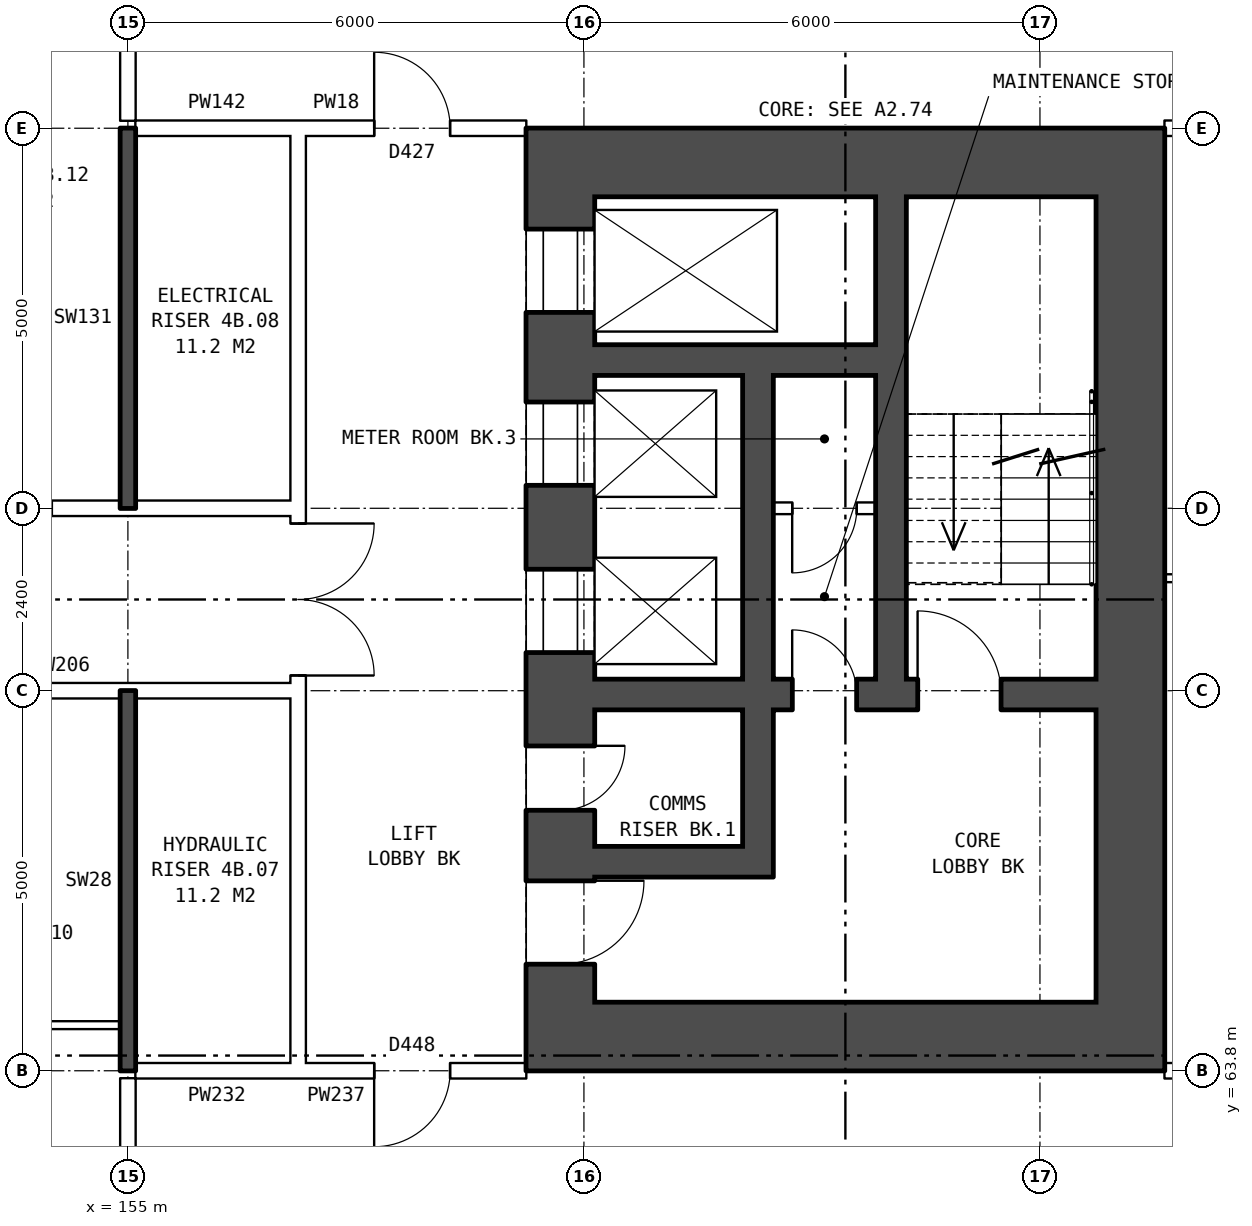
"""IFC4 building model, lengths in metres.
Left out: names, types, materials, properties, quantities, classifications, styles, units other than length and angle.
Written with IfcOpenShell. Run it as: python <this file> out.ifc"""

import sys

from ifc_helpers import new_model, si_unit, direction, frame, frame_2d, origin, place, context, subcontext, project, spatial, rectangle, extrude, element, fill, save


model = new_model("IFC4")
c1 = context("Model", 3, precision=1e-05, world=origin(), true_north=direction((0.0, 1.0)))
c2 = subcontext(c1, "Body", "Model", "MODEL_VIEW")
j1 = project(units=[si_unit("LENGTHUNIT", "METRE"), si_unit("PLANEANGLEUNIT", "RADIAN")], contexts=[c1])
p1 = place(None, origin())
s1 = spatial("IfcSite", under=j1, at=p1, CompositionType="ELEMENT")
p2 = place(p1, origin())
s2 = spatial("IfcBuilding", under=s1, at=p2, CompositionType="ELEMENT")
p3 = place(p2, frame((0.0, 0.0, 19.5)))
s3 = spatial("IfcBuildingStorey", under=s2, at=p3, CompositionType="ELEMENT", Elevation=19.5)
p4 = place(p3, frame((160.69, 75.3, 0.0), z_axis=(0.0, 0.0, 1.0), x_axis=(0.0, -1.0, 0.0)))
e1 = element("IfcWall", 1, at=p4, inside=s3, PredefinedType="SHEAR", context=c2, shape_type="SweptSolid", body=[
    extrude(rectangle(XDim=10.6, YDim=0.9, at=frame_2d((5.3, 0.0))), origin(), (0.0, 0.0, 1.0), 2.85),
])
p5 = place(p4, frame((0.425, 0.0, 0.0)))
e2 = element("IfcOpeningElement", 2, at=p5, cuts=e1, PredefinedType="OPENING", context=c2, shape_type="SweptSolid", body=[
    extrude(rectangle(XDim=1.1, YDim=2.1, at=frame_2d((0.55, 1.05))), frame((0.0, 0.46, 0.0), z_axis=(0.0, -1.0, 0.0), x_axis=(1.0, 0.0, 0.0)), (0.0, 0.0, 1.0), 0.92),
])
p6 = place(p4, frame((2.7, 0.0, 0.0)))
e3 = element("IfcOpeningElement", 3, at=p6, cuts=e1, PredefinedType="OPENING", context=c2, shape_type="SweptSolid", body=[
    extrude(rectangle(XDim=1.1, YDim=2.1, at=frame_2d((0.55, 1.05))), frame((0.0, 0.46, 0.0), z_axis=(0.0, -1.0, 0.0), x_axis=(1.0, 0.0, 0.0)), (0.0, 0.0, 1.0), 0.92),
])
p7 = place(p4, frame((4.9, 0.0, 0.0)))
e4 = element("IfcOpeningElement", 4, at=p7, cuts=e1, PredefinedType="OPENING", context=c2, shape_type="SweptSolid", body=[
    extrude(rectangle(XDim=1.1, YDim=2.1, at=frame_2d((0.55, 1.05))), frame((0.0, 0.46, 0.0), z_axis=(0.0, -1.0, 0.0), x_axis=(1.0, 0.0, 0.0)), (0.0, 0.0, 1.0), 0.92),
])
p8 = place(p4, frame((9.0, 0.0, 0.0)))
e5 = element("IfcOpeningElement", 5, at=p8, cuts=e1, PredefinedType="OPENING", context=c2, shape_type="SweptSolid", body=[
    extrude(rectangle(XDim=1.1, YDim=2.1, at=frame_2d((0.55, 1.05))), frame((0.0, 0.46, 0.0), z_axis=(0.0, -1.0, 0.0), x_axis=(1.0, 0.0, 0.0)), (0.0, 0.0, 1.0), 0.92),
])
p9 = place(p4, frame((7.225, 0.0, 0.0)))
e6 = element("IfcOpeningElement", 6, at=p9, cuts=e1, PredefinedType="OPENING", context=c2, shape_type="SweptSolid", body=[
    extrude(rectangle(XDim=0.85, YDim=2.1, at=frame_2d((0.425, 1.05))), frame((0.0, 0.46, 0.0), z_axis=(0.0, -1.0, 0.0), x_axis=(1.0, 0.0, 0.0)), (0.0, 0.0, 1.0), 0.92),
])
p10 = place(p3, frame((168.19, 75.3, 0.0), z_axis=(0.0, 0.0, 1.0), x_axis=(0.0, -1.0, 0.0)))
e7 = element("IfcWall", 7, at=p10, inside=s3, PredefinedType="SHEAR", context=c2, shape_type="SweptSolid", body=[
    extrude(rectangle(XDim=10.6, YDim=0.9, at=frame_2d((5.3, 0.0))), origin(), (0.0, 0.0, 1.0), 2.85),
])
for number, where, z_axis, x_axis in (
    (8, (160.24, 75.75, 0.0), (0.0, 0.0, 1.0), (1.0, 0.0, 0.0)),
    (9, (160.24, 64.25, 0.0), (0.0, 0.0, 1.0), (1.0, 0.0, 0.0)),
):
    element("IfcWall", number, at=place(p3, frame(where, z_axis=z_axis, x_axis=x_axis)), inside=s3, PredefinedType="SHEAR", context=c2, shape_type="SweptSolid", body=[
        extrude(rectangle(XDim=8.4, YDim=0.9, at=frame_2d((4.2, 0.0))), origin(), (0.0, 0.0, 1.0), 2.85),
    ])
p11 = place(p3, frame((161.14, 73.15, 0.0), z_axis=(0.0, 0.0, 1.0), x_axis=(1.0, 0.0, 0.0)))
e10 = element("IfcWall", 10, at=p11, inside=s3, PredefinedType="SHEAR", context=c2, shape_type="SweptSolid", body=[
    extrude(rectangle(XDim=3.7, YDim=0.4, at=frame_2d((1.85, 0.0))), origin(), (0.0, 0.0, 1.0), 2.85),
])
p12 = place(p3, frame((163.49, 71.2, 0.0), z_axis=(0.0, 0.0, 1.0), x_axis=(1.0, 0.0, 0.0)))
e11 = element("IfcWall", 11, at=p12, inside=s3, PredefinedType="PARTITIONING", context=c2, shape_type="SweptSolid", body=[
    extrude(rectangle(XDim=1.35, YDim=0.15, at=frame_2d((0.675, 0.0))), origin(), (0.0, 0.0, 1.0), 2.85),
])
p13 = place(p12, frame((0.25, 0.0, 0.0)))
e12 = element("IfcOpeningElement", 12, at=p13, cuts=e11, PredefinedType="OPENING", context=c2, shape_type="SweptSolid", body=[
    extrude(rectangle(XDim=0.85, YDim=2.1, at=frame_2d((0.425, 1.05))), frame((0.0, 0.085, 0.0), z_axis=(0.0, -1.0, 0.0), x_axis=(1.0, 0.0, 0.0)), (0.0, 0.0, 1.0), 0.17),
])
p14 = place(p3, frame((161.14, 68.75, 0.0), z_axis=(0.0, 0.0, 1.0), x_axis=(1.0, 0.0, 0.0)))
e13 = element("IfcWall", 13, at=p14, inside=s3, PredefinedType="SHEAR", context=c2, shape_type="SweptSolid", body=[
    extrude(rectangle(XDim=6.6, YDim=0.4, at=frame_2d((3.3, 0.0))), origin(), (0.0, 0.0, 1.0), 2.85),
])
p15 = place(p14, frame((4.25, 0.0, 0.0)))
e14 = element("IfcOpeningElement", 14, at=p15, cuts=e13, PredefinedType="OPENING", context=c2, shape_type="SweptSolid", body=[
    extrude(rectangle(XDim=1.1, YDim=2.1, at=frame_2d((0.55, 1.05))), frame((0.0, 0.21, 0.0), z_axis=(0.0, -1.0, 0.0), x_axis=(1.0, 0.0, 0.0)), (0.0, 0.0, 1.0), 0.42),
])
p16 = place(p14, frame((2.6, 0.0, 0.0)))
e15 = element("IfcOpeningElement", 15, at=p16, cuts=e13, PredefinedType="OPENING", context=c2, shape_type="SweptSolid", body=[
    extrude(rectangle(XDim=0.85, YDim=2.1, at=frame_2d((0.425, 1.05))), frame((0.0, 0.21, 0.0), z_axis=(0.0, -1.0, 0.0), x_axis=(1.0, 0.0, 0.0)), (0.0, 0.0, 1.0), 0.42),
])
p17 = place(p3, frame((161.14, 66.55, 0.0), z_axis=(0.0, 0.0, 1.0), x_axis=(1.0, 0.0, 0.0)))
e16 = element("IfcWall", 16, at=p17, inside=s3, PredefinedType="SHEAR", context=c2, shape_type="SweptSolid", body=[
    extrude(rectangle(XDim=1.95, YDim=0.4, at=frame_2d((0.975, 0.0))), origin(), (0.0, 0.0, 1.0), 2.85),
])
p18 = place(p3, frame((163.29, 72.95, 0.0), z_axis=(0.0, 0.0, 1.0), x_axis=(0.0, -1.0, 0.0)))
e17 = element("IfcWall", 17, at=p18, inside=s3, PredefinedType="SHEAR", context=c2, shape_type="SweptSolid", body=[
    extrude(rectangle(XDim=4.0, YDim=0.4, at=frame_2d((2.0, 0.0))), origin(), (0.0, 0.0, 1.0), 2.85),
])
p19 = place(p3, frame((163.29, 68.55, 0.0), z_axis=(0.0, 0.0, 1.0), x_axis=(0.0, -1.0, 0.0)))
e18 = element("IfcWall", 18, at=p19, inside=s3, PredefinedType="SHEAR", context=c2, shape_type="SweptSolid", body=[
    extrude(rectangle(XDim=2.2, YDim=0.4, at=frame_2d((1.1, 0.0))), origin(), (0.0, 0.0, 1.0), 2.85),
])
p20 = place(p3, frame((165.04, 75.3, 0.0), z_axis=(0.0, 0.0, 1.0), x_axis=(0.0, -1.0, 0.0)))
e19 = element("IfcWall", 19, at=p20, inside=s3, PredefinedType="SHEAR", context=c2, shape_type="SweptSolid", body=[
    extrude(rectangle(XDim=6.35, YDim=0.4, at=frame_2d((3.175, 0.0))), origin(), (0.0, 0.0, 1.0), 2.85),
])
p21 = place(p3, frame((157.24, 63.9, 0.0), z_axis=(0.0, 0.0, 1.0), x_axis=(0.0, 1.0, 0.0)))
e20 = element("IfcWall", 20, at=p21, inside=s3, PredefinedType="PARTITIONING", context=c2, shape_type="SweptSolid", body=[
    extrude(rectangle(XDim=12.2, YDim=0.2, at=frame_2d((6.1, 0.0))), origin(), (0.0, 0.0, 1.0), 2.85),
])
p22 = place(p21, frame((5.1, 0.0, 0.0)))
e21 = element("IfcOpeningElement", 21, at=p22, cuts=e20, PredefinedType="OPENING", context=c2, shape_type="SweptSolid", body=[
    extrude(rectangle(XDim=2.0, YDim=2.1, at=frame_2d((1.0, 1.05))), frame((0.0, 0.11, 0.0), z_axis=(0.0, -1.0, 0.0), x_axis=(1.0, 0.0, 0.0)), (0.0, 0.0, 1.0), 0.22),
])
p23 = place(p3, frame((155.1, 63.8, 0.0), z_axis=(0.0, 0.0, 1.0), x_axis=(1.0, 0.0, 0.0)))
e22 = element("IfcWall", 22, at=p23, inside=s3, PredefinedType="PARTITIONING", context=c2, shape_type="SweptSolid", body=[
    extrude(rectangle(XDim=2.14, YDim=0.2, at=frame_2d((1.07, 0.0))), origin(), (0.0, 0.0, 1.0), 2.85),
])
p24 = place(p3, frame((157.24, 63.8, 0.0), z_axis=(0.0, 0.0, 1.0), x_axis=(1.0, 0.0, 0.0)))
e23 = element("IfcWall", 23, at=p24, inside=s3, PredefinedType="PARTITIONING", context=c2, shape_type="SweptSolid", body=[
    extrude(rectangle(XDim=3.0, YDim=0.2, at=frame_2d((1.5, 0.0))), origin(), (0.0, 0.0, 1.0), 2.85),
])
p25 = place(p24, frame((1.0, 0.0, 0.0)))
e24 = element("IfcOpeningElement", 24, at=p25, cuts=e23, PredefinedType="OPENING", context=c2, shape_type="SweptSolid", body=[
    extrude(rectangle(XDim=1.0, YDim=2.1, at=frame_2d((0.5, 1.05))), frame((0.0, 0.11, 0.0), z_axis=(0.0, -1.0, 0.0), x_axis=(1.0, 0.0, 0.0)), (0.0, 0.0, 1.0), 0.22),
])
p26 = place(p3, frame((168.64, 63.8, 0.0), z_axis=(0.0, 0.0, 1.0), x_axis=(1.0, 0.0, 0.0)))
e25 = element("IfcWall", 25, at=p26, inside=s3, PredefinedType="PARTITIONING", context=c2, shape_type="SweptSolid", body=[
    extrude(rectangle(XDim=6.35, YDim=0.2, at=frame_2d((3.175, 0.0))), origin(), (0.0, 0.0, 1.0), 2.85),
])
p27 = place(p26, frame((1.78, 0.0, 0.0)))
e26 = element("IfcOpeningElement", 26, at=p27, cuts=e25, PredefinedType="OPENING", context=c2, shape_type="SweptSolid", body=[
    extrude(rectangle(XDim=0.8, YDim=2.1, at=frame_2d((0.4, 1.05))), frame((0.0, 0.11, 0.0), z_axis=(0.0, -1.0, 0.0), x_axis=(1.0, 0.0, 0.0)), (0.0, 0.0, 1.0), 0.22),
])
p28 = place(p3, frame((152.0, 64.4, 0.0), z_axis=(0.0, 0.0, 1.0), x_axis=(1.0, 0.0, 0.0)))
e27 = element("IfcWall", 27, at=p28, inside=s3, PredefinedType="PARTITIONING", context=c2, shape_type="SweptSolid", body=[
    extrude(rectangle(XDim=2.9, YDim=0.1, at=frame_2d((1.45, 0.0))), origin(), (0.0, 0.0, 1.0), 2.85),
])
p29 = place(p3, frame((142.76, 68.8, 0.0), z_axis=(0.0, 0.0, 1.0), x_axis=(1.0, 0.0, 0.0)))
e28 = element("IfcWall", 28, at=p29, inside=s3, PredefinedType="PARTITIONING", context=c2, shape_type="SweptSolid", body=[
    extrude(rectangle(XDim=14.48, YDim=0.2, at=frame_2d((7.24, 0.0))), origin(), (0.0, 0.0, 1.0), 2.85),
])
p30 = place(p29, frame((4.24, 0.0, 0.0)))
e29 = element("IfcOpeningElement", 29, at=p30, cuts=e28, PredefinedType="OPENING", context=c2, shape_type="SweptSolid", body=[
    extrude(rectangle(XDim=1.0, YDim=2.1, at=frame_2d((0.5, 1.05))), frame((0.0, 0.11, 0.0), z_axis=(0.0, -1.0, 0.0), x_axis=(1.0, 0.0, 0.0)), (0.0, 0.0, 1.0), 0.22),
])
p31 = place(p29, frame((7.24, 0.0, 0.0)))
e30 = element("IfcOpeningElement", 30, at=p31, cuts=e28, PredefinedType="OPENING", context=c2, shape_type="SweptSolid", body=[
    extrude(rectangle(XDim=1.0, YDim=2.1, at=frame_2d((0.5, 1.05))), frame((0.0, 0.11, 0.0), z_axis=(0.0, -1.0, 0.0), x_axis=(1.0, 0.0, 0.0)), (0.0, 0.0, 1.0), 0.22),
])
p32 = place(p3, frame((168.64, 70.28, 0.0), z_axis=(0.0, 0.0, 1.0), x_axis=(1.0, 0.0, 0.0)))
e31 = element("IfcWall", 31, at=p32, inside=s3, PredefinedType="PARTITIONING", context=c2, shape_type="SweptSolid", body=[
    extrude(rectangle(XDim=4.26, YDim=0.1, at=frame_2d((2.13, 0.0))), origin(), (0.0, 0.0, 1.0), 2.85),
])
p33 = place(p3, frame((142.76, 71.2, 0.0), z_axis=(0.0, 0.0, 1.0), x_axis=(1.0, 0.0, 0.0)))
e32 = element("IfcWall", 32, at=p33, inside=s3, PredefinedType="PARTITIONING", context=c2, shape_type="SweptSolid", body=[
    extrude(rectangle(XDim=14.48, YDim=0.2, at=frame_2d((7.24, 0.0))), origin(), (0.0, 0.0, 1.0), 2.85),
])
p34 = place(p33, frame((4.24, 0.0, 0.0)))
e33 = element("IfcOpeningElement", 33, at=p34, cuts=e32, PredefinedType="OPENING", context=c2, shape_type="SweptSolid", body=[
    extrude(rectangle(XDim=1.0, YDim=2.1, at=frame_2d((0.5, 1.05))), frame((0.0, 0.11, 0.0), z_axis=(0.0, -1.0, 0.0), x_axis=(1.0, 0.0, 0.0)), (0.0, 0.0, 1.0), 0.22),
])
p35 = place(p33, frame((10.24, 0.0, 0.0)))
e34 = element("IfcOpeningElement", 34, at=p35, cuts=e32, PredefinedType="OPENING", context=c2, shape_type="SweptSolid", body=[
    extrude(rectangle(XDim=1.0, YDim=2.1, at=frame_2d((0.5, 1.05))), frame((0.0, 0.11, 0.0), z_axis=(0.0, -1.0, 0.0), x_axis=(1.0, 0.0, 0.0)), (0.0, 0.0, 1.0), 0.22),
])
p36 = place(p3, frame((155.1, 76.2, 0.0), z_axis=(0.0, 0.0, 1.0), x_axis=(1.0, 0.0, 0.0)))
e35 = element("IfcWall", 35, at=p36, inside=s3, PredefinedType="PARTITIONING", context=c2, shape_type="SweptSolid", body=[
    extrude(rectangle(XDim=2.14, YDim=0.2, at=frame_2d((1.07, 0.0))), origin(), (0.0, 0.0, 1.0), 2.85),
])
p37 = place(p3, frame((157.24, 76.2, 0.0), z_axis=(0.0, 0.0, 1.0), x_axis=(1.0, 0.0, 0.0)))
e36 = element("IfcWall", 36, at=p37, inside=s3, PredefinedType="PARTITIONING", context=c2, shape_type="SweptSolid", body=[
    extrude(rectangle(XDim=3.0, YDim=0.2, at=frame_2d((1.5, 0.0))), origin(), (0.0, 0.0, 1.0), 2.85),
])
p38 = place(p37, frame((1.0, 0.0, 0.0)))
e37 = element("IfcOpeningElement", 37, at=p38, cuts=e36, PredefinedType="OPENING", context=c2, shape_type="SweptSolid", body=[
    extrude(rectangle(XDim=1.0, YDim=2.1, at=frame_2d((0.5, 1.05))), frame((0.0, 0.11, 0.0), z_axis=(0.0, -1.0, 0.0), x_axis=(1.0, 0.0, 0.0)), (0.0, 0.0, 1.0), 0.22),
])
p39 = place(p3, frame((168.64, 76.2, 0.0), z_axis=(0.0, 0.0, 1.0), x_axis=(1.0, 0.0, 0.0)))
e38 = element("IfcWall", 38, at=p39, inside=s3, PredefinedType="PARTITIONING", context=c2, shape_type="SweptSolid", body=[
    extrude(rectangle(XDim=6.35, YDim=0.2, at=frame_2d((3.175, 0.0))), origin(), (0.0, 0.0, 1.0), 2.85),
])
p40 = place(p39, frame((1.78, 0.0, 0.0)))
e39 = element("IfcOpeningElement", 39, at=p40, cuts=e38, PredefinedType="OPENING", context=c2, shape_type="SweptSolid", body=[
    extrude(rectangle(XDim=0.8, YDim=2.1, at=frame_2d((0.4, 1.05))), frame((0.0, 0.11, 0.0), z_axis=(0.0, -1.0, 0.0), x_axis=(1.0, 0.0, 0.0)), (0.0, 0.0, 1.0), 0.22),
])
p41 = place(p3, frame((155.0, 61.5, 0.0), z_axis=(0.0, 0.0, 1.0), x_axis=(0.0, 1.0, 0.0)))
e40 = element("IfcWall", 40, at=p41, inside=s3, PredefinedType="PARTITIONING", context=c2, shape_type="SweptSolid", body=[
    extrude(rectangle(XDim=2.2, YDim=0.2, at=frame_2d((1.1, 0.0))), origin(), (0.0, 0.0, 1.0), 2.85),
])
for number, where, z_axis, x_axis in (
    (41, (155.0, 63.8, 0.0), (0.0, 0.0, 1.0), (0.0, 1.0, 0.0)),
    (42, (155.0, 71.2, 0.0), (0.0, 0.0, 1.0), (0.0, 1.0, 0.0)),
):
    element("IfcWall", number, at=place(p3, frame(where, z_axis=z_axis, x_axis=x_axis)), inside=s3, PredefinedType="SOLIDWALL", context=c2, shape_type="SweptSolid", body=[
        extrude(rectangle(XDim=5.0, YDim=0.2, at=frame_2d((2.5, 0.0))), origin(), (0.0, 0.0, 1.0), 2.85),
    ])
p42 = place(p3, frame((155.0, 76.3, 0.0), z_axis=(0.0, 0.0, 1.0), x_axis=(0.0, 1.0, 0.0)))
e43 = element("IfcWall", 43, at=p42, inside=s3, PredefinedType="PARTITIONING", context=c2, shape_type="SweptSolid", body=[
    extrude(rectangle(XDim=2.2, YDim=0.2, at=frame_2d((1.1, 0.0))), origin(), (0.0, 0.0, 1.0), 2.85),
])
p43 = place(p5, origin())
e44 = element("IfcDoor", 44, at=p43, inside=s3, OperationType="DOUBLE_DOOR_SLIDING", PredefinedType="DOOR", context=c2, shape_type="SweptSolid", body=[
    extrude(rectangle(XDim=1.1, YDim=2.1, at=frame_2d((0.55, 1.05))), frame((0.0, 0.435, 0.0), z_axis=(0.0, -1.0, 0.0), x_axis=(1.0, 0.0, 0.0)), (0.0, 0.0, 1.0), 0.05),
])
fill(e2, e44)
p44 = place(p6, origin())
e45 = element("IfcDoor", 45, at=p44, inside=s3, OperationType="DOUBLE_DOOR_SLIDING", PredefinedType="DOOR", context=c2, shape_type="SweptSolid", body=[
    extrude(rectangle(XDim=1.1, YDim=2.1, at=frame_2d((0.55, 1.05))), frame((0.0, 0.435, 0.0), z_axis=(0.0, -1.0, 0.0), x_axis=(1.0, 0.0, 0.0)), (0.0, 0.0, 1.0), 0.05),
])
fill(e3, e45)
p45 = place(p7, origin())
e46 = element("IfcDoor", 46, at=p45, inside=s3, OperationType="DOUBLE_DOOR_SLIDING", PredefinedType="DOOR", context=c2, shape_type="SweptSolid", body=[
    extrude(rectangle(XDim=1.1, YDim=2.1, at=frame_2d((0.55, 1.05))), frame((0.0, 0.435, 0.0), z_axis=(0.0, -1.0, 0.0), x_axis=(1.0, 0.0, 0.0)), (0.0, 0.0, 1.0), 0.05),
])
fill(e4, e46)
p46 = place(p8, origin())
e47 = element("IfcDoor", 47, at=p46, inside=s3, OperationType="SINGLE_SWING_LEFT", PredefinedType="DOOR", context=c2, shape_type="SweptSolid", body=[
    extrude(rectangle(XDim=1.1, YDim=2.1, at=frame_2d((0.55, 1.05))), frame((0.0, 0.435, 0.0), z_axis=(0.0, -1.0, 0.0), x_axis=(1.0, 0.0, 0.0)), (0.0, 0.0, 1.0), 0.05),
])
fill(e5, e47)
p47 = place(p15, origin())
e48 = element("IfcDoor", 48, at=p47, inside=s3, OperationType="SINGLE_SWING_LEFT", PredefinedType="DOOR", context=c2, shape_type="SweptSolid", body=[
    extrude(rectangle(XDim=1.1, YDim=2.1, at=frame_2d((0.55, 1.05))), frame((0.0, 0.025, 0.0), z_axis=(0.0, -1.0, 0.0), x_axis=(1.0, 0.0, 0.0)), (0.0, 0.0, 1.0), 0.05),
])
fill(e14, e48)
p48 = place(p9, origin())
e49 = element("IfcDoor", 49, at=p48, inside=s3, OperationType="SINGLE_SWING_LEFT", PredefinedType="DOOR", context=c2, shape_type="SweptSolid", body=[
    extrude(rectangle(XDim=0.85, YDim=2.1, at=frame_2d((0.425, 1.05))), frame((0.0, 0.435, 0.0), z_axis=(0.0, -1.0, 0.0), x_axis=(1.0, 0.0, 0.0)), (0.0, 0.0, 1.0), 0.05),
])
fill(e6, e49)
p49 = place(p16, origin())
e50 = element("IfcDoor", 50, at=p49, inside=s3, OperationType="SINGLE_SWING_LEFT", PredefinedType="DOOR", context=c2, shape_type="SweptSolid", body=[
    extrude(rectangle(XDim=0.85, YDim=2.1, at=frame_2d((0.425, 1.05))), frame((0.0, 0.025, 0.0), z_axis=(0.0, -1.0, 0.0), x_axis=(1.0, 0.0, 0.0)), (0.0, 0.0, 1.0), 0.05),
])
fill(e15, e50)
p50 = place(p13, frame((0.85, 0.0, 0.0), z_axis=(0.0, 0.0, 1.0), x_axis=(-1.0, 0.0, 0.0)))
e51 = element("IfcDoor", 51, at=p50, inside=s3, OperationType="SINGLE_SWING_RIGHT", PredefinedType="DOOR", context=c2, shape_type="SweptSolid", body=[
    extrude(rectangle(XDim=0.85, YDim=2.1, at=frame_2d((0.425, 1.05))), frame((0.0, 0.025, 0.0), z_axis=(0.0, -1.0, 0.0), x_axis=(1.0, 0.0, 0.0)), (0.0, 0.0, 1.0), 0.05),
])
fill(e12, e51)
p51 = place(p22, frame((2.0, 0.0, 0.0), z_axis=(0.0, 0.0, 1.0), x_axis=(-1.0, 0.0, 0.0)))
e52 = element("IfcDoor", 52, at=p51, inside=s3, OperationType="DOUBLE_DOOR_SINGLE_SWING", PredefinedType="DOOR", context=c2, shape_type="SweptSolid", body=[
    extrude(rectangle(XDim=2.0, YDim=2.1, at=frame_2d((1.0, 1.05))), frame((0.0, 0.025, 0.0), z_axis=(0.0, -1.0, 0.0), x_axis=(1.0, 0.0, 0.0)), (0.0, 0.0, 1.0), 0.05),
])
fill(e21, e52)
p52 = place(p25, frame((1.0, 0.0, 0.0), z_axis=(0.0, 0.0, 1.0), x_axis=(-1.0, 0.0, 0.0)))
e53 = element("IfcDoor", 53, at=p52, inside=s3, OperationType="SINGLE_SWING_RIGHT", PredefinedType="DOOR", context=c2, shape_type="SweptSolid", body=[
    extrude(rectangle(XDim=1.0, YDim=2.1, at=frame_2d((0.5, 1.05))), frame((0.0, 0.025, 0.0), z_axis=(0.0, -1.0, 0.0), x_axis=(1.0, 0.0, 0.0)), (0.0, 0.0, 1.0), 0.05),
])
fill(e24, e53)
p53 = place(p38, origin())
e54 = element("IfcDoor", 54, at=p53, inside=s3, OperationType="SINGLE_SWING_LEFT", PredefinedType="DOOR", context=c2, shape_type="SweptSolid", body=[
    extrude(rectangle(XDim=1.0, YDim=2.1, at=frame_2d((0.5, 1.05))), frame((0.0, 0.025, 0.0), z_axis=(0.0, -1.0, 0.0), x_axis=(1.0, 0.0, 0.0)), (0.0, 0.0, 1.0), 0.05),
])
fill(e37, e54)
save(model, sys.argv[1])
